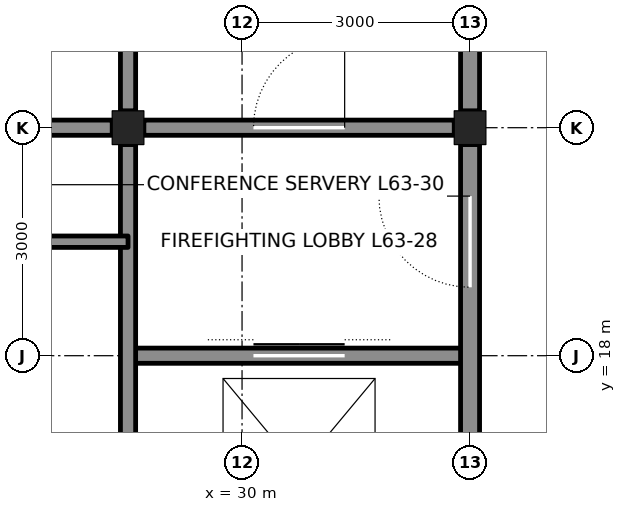
"""IFC4 building model, lengths in metres.
Left out: names, types, materials, properties, quantities, classifications, styles, units other than length and angle.
Written with IfcOpenShell. Run it as: python <this file> out.ifc"""

import sys

from ifc_helpers import new_model, si_unit, direction, frame, frame_2d, origin, origin_2d, place, context, subcontext, project, spatial, rectangle, i_section, extrude, element, fill, save


model = new_model("IFC4")
c1 = context("Model", 3, precision=1e-05, world=origin(), true_north=direction((0.0, 1.0)))
c2 = subcontext(c1, "Body", "Model", "MODEL_VIEW")
j1 = project(units=[si_unit("LENGTHUNIT", "METRE"), si_unit("PLANEANGLEUNIT", "RADIAN")], contexts=[c1])
p1 = place(None, origin())
s1 = spatial("IfcSite", under=j1, at=p1, CompositionType="ELEMENT")
p2 = place(p1, origin())
s2 = spatial("IfcBuilding", under=s1, at=p2, CompositionType="ELEMENT")
p3 = place(p2, frame((0.0, 0.0, 283.2)))
s3 = spatial("IfcBuildingStorey", under=s2, at=p3, CompositionType="ELEMENT", Elevation=283.2)
for number, where, z_axis, x_axis in (
    (1, (33.0, 21.0, 0.0), (0.0, 0.0, 1.0), (1.0, 0.0, 0.0)),
    (2, (28.5, 21.0, 0.0), (0.0, 0.0, 1.0), (1.0, 0.0, 0.0)),
):
    element("IfcColumn", number, at=place(p3, frame(where, z_axis=z_axis, x_axis=x_axis)), inside=s3, PredefinedType="COLUMN", context=c2, shape_type="SweptSolid", body=[
        extrude(i_section(OverallWidth=0.417, OverallDepth=0.445, WebThickness=0.039, FlangeThickness=0.063, at=origin_2d()), origin(), (0.0, 0.0, 1.0), 4.2),
    ])
p4 = place(p3, frame((28.5, 18.0, 0.0), z_axis=(0.0, 0.0, 1.0), x_axis=(1.0, 0.0, 0.0)))
e3 = element("IfcWall", 3, at=p4, inside=s3, PredefinedType="SOLIDWALL", context=c2, shape_type="SweptSolid", body=[
    extrude(rectangle(XDim=4.5, YDim=0.2, at=frame_2d((2.25, 0.0))), origin(), (0.0, 0.0, 1.0), 4.04),
])
p5 = place(p4, frame((1.65, 0.0, 0.0)))
e4 = element("IfcOpeningElement", 4, at=p5, cuts=e3, PredefinedType="OPENING", context=c2, shape_type="SweptSolid", body=[
    extrude(rectangle(XDim=1.2, YDim=2.1, at=frame_2d((0.6, 1.05))), frame((0.0, 0.11, 0.0), z_axis=(0.0, -1.0, 0.0), x_axis=(1.0, 0.0, 0.0)), (0.0, 0.0, 1.0), 0.22),
])
p6 = place(p3, frame((25.5, 21.0, 0.0), z_axis=(0.0, 0.0, 1.0), x_axis=(1.0, 0.0, 0.0)))
e5 = element("IfcWall", 5, at=p6, inside=s3, PredefinedType="SOLIDWALL", context=c2, shape_type="SweptSolid", body=[
    extrude(rectangle(XDim=2.792, YDim=0.2, at=frame_2d((1.396, 0.0))), origin(), (0.0, 0.0, 1.0), 3.09),
])
p7 = place(p3, frame((28.708, 21.0, 0.0), z_axis=(0.0, 0.0, 1.0), x_axis=(1.0, 0.0, 0.0)))
e6 = element("IfcWall", 6, at=p7, inside=s3, PredefinedType="SOLIDWALL", context=c2, shape_type="SweptSolid", body=[
    extrude(rectangle(XDim=4.083, YDim=0.2, at=frame_2d((2.042, 0.0))), origin(), (0.0, 0.0, 1.0), 3.09),
])
p8 = place(p7, frame((1.442, 0.0, 0.0)))
e7 = element("IfcOpeningElement", 7, at=p8, cuts=e6, PredefinedType="OPENING", context=c2, shape_type="SweptSolid", body=[
    extrude(rectangle(XDim=1.2, YDim=2.1, at=frame_2d((0.6, 1.05))), frame((0.0, 0.11, 0.0), z_axis=(0.0, -1.0, 0.0), x_axis=(1.0, 0.0, 0.0)), (0.0, 0.0, 1.0), 0.22),
])
p9 = place(p3, frame((28.5, 12.222, 0.0), z_axis=(0.0, 0.0, 1.0), x_axis=(0.0, 1.0, 0.0)))
e8 = element("IfcWall", 8, at=p9, inside=s3, PredefinedType="SOLIDWALL", context=c2, shape_type="SweptSolid", body=[
    extrude(rectangle(XDim=8.555, YDim=0.2, at=frame_2d((4.278, 0.0))), origin(), (0.0, 0.0, 1.0), 3.113),
])
p10 = place(p3, frame((28.5, 21.222, 0.0), z_axis=(0.0, 0.0, 1.0), x_axis=(0.0, 1.0, 0.0)))
e9 = element("IfcWall", 9, at=p10, inside=s3, PredefinedType="SOLIDWALL", context=c2, shape_type="SweptSolid", body=[
    extrude(rectangle(XDim=2.555, YDim=0.2, at=frame_2d((1.278, 0.0))), origin(), (0.0, 0.0, 1.0), 3.113),
])
p11 = place(p3, frame((33.0, 12.25, 0.0), z_axis=(0.0, 0.0, 1.0), x_axis=(0.0, 1.0, 0.0)))
e10 = element("IfcWall", 10, at=p11, inside=s3, PredefinedType="SOLIDWALL", context=c2, shape_type="SweptSolid", body=[
    extrude(rectangle(XDim=8.528, YDim=0.25, at=frame_2d((4.264, 0.0))), origin(), (0.0, 0.0, 1.0), 3.113),
])
p12 = place(p11, frame((6.65, 0.0, 0.0)))
e11 = element("IfcOpeningElement", 11, at=p12, cuts=e10, PredefinedType="OPENING", context=c2, shape_type="SweptSolid", body=[
    extrude(rectangle(XDim=1.2, YDim=2.1, at=frame_2d((0.6, 1.05))), frame((0.0, 0.135, 0.0), z_axis=(0.0, -1.0, 0.0), x_axis=(1.0, 0.0, 0.0)), (0.0, 0.0, 1.0), 0.27),
])
p13 = place(p11, frame((0.875, 0.0, 0.0)))
e12 = element("IfcOpeningElement", 12, at=p13, cuts=e10, PredefinedType="OPENING", context=c2, shape_type="SweptSolid", body=[
    extrude(rectangle(XDim=0.75, YDim=2.1, at=frame_2d((0.375, 1.05))), frame((0.0, 0.135, 0.0), z_axis=(0.0, -1.0, 0.0), x_axis=(1.0, 0.0, 0.0)), (0.0, 0.0, 1.0), 0.27),
])
p14 = place(p3, frame((33.0, 21.222, 0.0), z_axis=(0.0, 0.0, 1.0), x_axis=(0.0, 1.0, 0.0)))
e13 = element("IfcWall", 13, at=p14, inside=s3, PredefinedType="SOLIDWALL", context=c2, shape_type="SweptSolid", body=[
    extrude(rectangle(XDim=2.555, YDim=0.25, at=frame_2d((1.278, 0.0))), origin(), (0.0, 0.0, 1.0), 3.113),
])
p15 = place(p3, frame((25.5, 19.5, 0.0), z_axis=(0.0, 0.0, 1.0), x_axis=(1.0, 0.0, 0.0)))
e14 = element("IfcWall", 14, at=p15, inside=s3, PredefinedType="PARTITIONING", context=c2, shape_type="SweptSolid", body=[
    extrude(rectangle(XDim=3.0, YDim=0.15, at=frame_2d((1.5, 0.0))), origin(), (0.0, 0.0, 1.0), 4.04),
])
p16 = place(p8, origin())
e15 = element("IfcDoor", 15, at=p16, inside=s3, OperationType="SINGLE_SWING_RIGHT", PredefinedType="DOOR", context=c2, shape_type="SweptSolid", body=[
    extrude(rectangle(XDim=1.2, YDim=2.1, at=frame_2d((0.6, 1.05))), frame((0.0, 0.025, 0.0), z_axis=(0.0, -1.0, 0.0), x_axis=(1.0, 0.0, 0.0)), (0.0, 0.0, 1.0), 0.05),
])
fill(e7, e15)
p17 = place(p12, origin())
e16 = element("IfcDoor", 16, at=p17, inside=s3, OperationType="SINGLE_SWING_RIGHT", PredefinedType="DOOR", context=c2, shape_type="SweptSolid", body=[
    extrude(rectangle(XDim=1.2, YDim=2.1, at=frame_2d((0.6, 1.05))), frame((0.0, 0.025, 0.0), z_axis=(0.0, -1.0, 0.0), x_axis=(1.0, 0.0, 0.0)), (0.0, 0.0, 1.0), 0.05),
])
fill(e11, e16)
p18 = place(p5, origin())
e17 = element("IfcDoor", 17, at=p18, inside=s3, OperationType="DOUBLE_DOOR_SLIDING", PredefinedType="DOOR", context=c2, shape_type="SweptSolid", body=[
    extrude(rectangle(XDim=1.2, YDim=2.1, at=frame_2d((0.6, 1.05))), frame((0.0, 0.025, 0.0), z_axis=(0.0, -1.0, 0.0), x_axis=(1.0, 0.0, 0.0)), (0.0, 0.0, 1.0), 0.05),
])
fill(e4, e17)
save(model, sys.argv[1])
